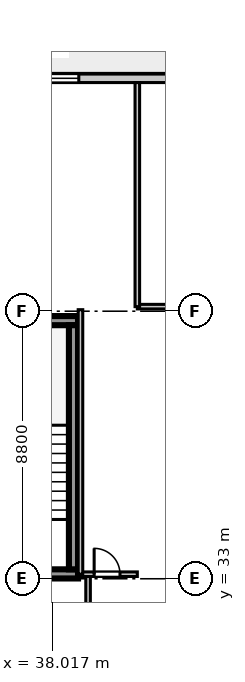
"""IFC4 building model, lengths in metres.
Left out: names, types, materials, properties, quantities, classifications, styles, units other than length and angle.
Written with IfcOpenShell. Run it as: python <this file> out.ifc"""

import sys

from ifc_helpers import new_model, si_unit, direction, frame, frame_2d, origin, place, context, subcontext, project, spatial, rectangle, extrude, element, fill, save


model = new_model("IFC4")
c1 = context("Model", 3, precision=1e-05, world=origin(), true_north=direction((0.0, 1.0)))
c2 = subcontext(c1, "Body", "Model", "MODEL_VIEW")
j1 = project(units=[si_unit("LENGTHUNIT", "METRE"), si_unit("PLANEANGLEUNIT", "RADIAN")], contexts=[c1])
p1 = place(None, origin())
s1 = spatial("IfcSite", under=j1, at=p1, CompositionType="ELEMENT")
p2 = place(p1, origin())
s2 = spatial("IfcBuilding", under=s1, at=p2, CompositionType="ELEMENT")
p3 = place(p2, frame((0.0, 0.0, 196.4)))
s3 = spatial("IfcBuildingStorey", under=s2, at=p3, CompositionType="ELEMENT", Elevation=196.4)
for number, where, z_axis, x_axis in (
    (1, (34.275, 33.16, 0.0), (0.0, 0.0, 1.0), (1.0, 0.0, 0.0)),
    (2, (34.275, 41.49, 0.0), (0.0, 0.0, 1.0), (1.0, 0.0, 0.0)),
):
    element("IfcWall", number, at=place(p3, frame(where, z_axis=z_axis, x_axis=x_axis)), inside=s3, PredefinedType="SHEAR", context=c2, shape_type="SweptSolid", body=[
        extrude(rectangle(XDim=4.595, YDim=0.3, at=frame_2d((2.298, 0.0))), origin(), (0.0, 0.0, 1.0), 3.6),
    ])
p4 = place(p3, frame((38.72, 33.31, 0.0), z_axis=(0.0, 0.0, 1.0), x_axis=(0.0, 1.0, 0.0)))
e3 = element("IfcWall", 3, at=p4, inside=s3, PredefinedType="SHEAR", context=c2, shape_type="SweptSolid", body=[
    extrude(rectangle(XDim=8.03, YDim=0.3, at=frame_2d((4.015, 0.0))), origin(), (0.0, 0.0, 1.0), 3.6),
])
p5 = place(p3, frame((45.55, 49.46, 0.0), z_axis=(0.0, 0.0, 1.0), x_axis=(-1.0, 0.0, 0.0)))
e4 = element("IfcWall", 4, at=p5, inside=s3, PredefinedType="STANDARD", context=c2, shape_type="SweptSolid", body=[
    extrude(rectangle(XDim=32.5, YDim=0.28, at=frame_2d((16.25, 0.0))), origin(), (0.0, 0.0, 1.0), 3.6),
])
p6 = place(p5, frame((30.55, 0.0, 0.0)))
e5 = element("IfcOpeningElement", 5, at=p6, cuts=e4, PredefinedType="OPENING", context=c2, shape_type="SweptSolid", body=[
    extrude(rectangle(XDim=1.0, YDim=2.05, at=frame_2d((0.5, 1.025))), frame((0.0, 0.15, 0.0), z_axis=(0.0, -1.0, 0.0), x_axis=(1.0, 0.0, 0.0)), (0.0, 0.0, 1.0), 0.3),
])
p7 = place(p5, frame((24.27, 0.0, 0.8)))
e6 = element("IfcOpeningElement", 6, at=p7, cuts=e4, PredefinedType="OPENING", context=c2, shape_type="SweptSolid", body=[
    extrude(rectangle(XDim=2.4, YDim=2.05, at=frame_2d((1.2, 1.025))), frame((0.0, 0.15, 0.0), z_axis=(0.0, -1.0, 0.0), x_axis=(1.0, 0.0, 0.0)), (0.0, 0.0, 1.0), 0.3),
])
p8 = place(p5, frame((18.43, 0.0, 0.8)))
e7 = element("IfcOpeningElement", 7, at=p8, cuts=e4, PredefinedType="OPENING", context=c2, shape_type="SweptSolid", body=[
    extrude(rectangle(XDim=1.2, YDim=1.75, at=frame_2d((0.6, 0.875))), frame((0.0, 0.15, 0.0), z_axis=(0.0, -1.0, 0.0), x_axis=(1.0, 0.0, 0.0)), (0.0, 0.0, 1.0), 0.3),
])
p9 = place(p5, frame((16.065, 0.0, 0.8)))
e8 = element("IfcOpeningElement", 8, at=p9, cuts=e4, PredefinedType="OPENING", context=c2, shape_type="SweptSolid", body=[
    extrude(rectangle(XDim=1.2, YDim=1.75, at=frame_2d((0.6, 0.875))), frame((0.0, 0.15, 0.0), z_axis=(0.0, -1.0, 0.0), x_axis=(1.0, 0.0, 0.0)), (0.0, 0.0, 1.0), 0.3),
])
p10 = place(p5, frame((13.455, 0.0, 0.8)))
e9 = element("IfcOpeningElement", 9, at=p10, cuts=e4, PredefinedType="OPENING", context=c2, shape_type="SweptSolid", body=[
    extrude(rectangle(XDim=1.65, YDim=1.95, at=frame_2d((0.825, 0.975))), frame((0.0, 0.15, 0.0), z_axis=(0.0, -1.0, 0.0), x_axis=(1.0, 0.0, 0.0)), (0.0, 0.0, 1.0), 0.3),
])
p11 = place(p5, frame((11.295, 0.0, 0.8)))
e10 = element("IfcOpeningElement", 10, at=p11, cuts=e4, PredefinedType="OPENING", context=c2, shape_type="SweptSolid", body=[
    extrude(rectangle(XDim=1.2, YDim=1.75, at=frame_2d((0.6, 0.875))), frame((0.0, 0.15, 0.0), z_axis=(0.0, -1.0, 0.0), x_axis=(1.0, 0.0, 0.0)), (0.0, 0.0, 1.0), 0.3),
])
p12 = place(p5, frame((6.655, 0.0, 0.8)))
e11 = element("IfcOpeningElement", 11, at=p12, cuts=e4, PredefinedType="OPENING", context=c2, shape_type="SweptSolid", body=[
    extrude(rectangle(XDim=2.25, YDim=2.0, at=frame_2d((1.125, 1.0))), frame((0.0, 0.15, 0.0), z_axis=(0.0, -1.0, 0.0), x_axis=(1.0, 0.0, 0.0)), (0.0, 0.0, 1.0), 0.3),
])
p13 = place(p5, frame((1.52, 0.0, 0.8)))
e12 = element("IfcOpeningElement", 12, at=p13, cuts=e4, PredefinedType="OPENING", context=c2, shape_type="SweptSolid", body=[
    extrude(rectangle(XDim=1.8, YDim=2.0, at=frame_2d((0.9, 1.0))), frame((0.0, 0.15, 0.0), z_axis=(0.0, -1.0, 0.0), x_axis=(1.0, 0.0, 0.0)), (0.0, 0.0, 1.0), 0.3),
])
p14 = place(p3, frame((39.2, 28.86, 0.0), z_axis=(0.0, 0.0, 1.0), x_axis=(0.0, 1.0, 0.0)))
e13 = element("IfcWall", 13, at=p14, inside=s3, PredefinedType="PARTITIONING", context=c2, shape_type="SweptSolid", body=[
    extrude(rectangle(XDim=4.22, YDim=0.15, at=frame_2d((2.11, 0.0))), origin(), (0.0, 0.0, 1.0), 3.6),
])
p15 = place(p3, frame((40.82, 41.95, 0.0), z_axis=(0.0, 0.0, 1.0), x_axis=(1.0, 0.0, 0.0)))
e14 = element("IfcWall", 14, at=p15, inside=s3, PredefinedType="PARTITIONING", context=c2, shape_type="SweptSolid", body=[
    extrude(rectangle(XDim=9.7, YDim=0.15, at=frame_2d((4.85, 0.0))), origin(), (0.0, 0.0, 1.0), 2.95),
])
p16 = place(p3, frame((38.95, 33.15, 0.0), z_axis=(0.0, 0.0, 1.0), x_axis=(1.0, 0.0, 0.0)))
e15 = element("IfcWall", 15, at=p16, inside=s3, PredefinedType="PARTITIONING", context=c2, shape_type="SweptSolid", body=[
    extrude(rectangle(XDim=1.87, YDim=0.15, at=frame_2d((0.935, 0.0))), origin(), (0.0, 0.0, 1.0), 3.6),
])
p17 = place(p16, frame((0.45, 0.0, 0.0)))
e16 = element("IfcOpeningElement", 16, at=p17, cuts=e15, PredefinedType="OPENING", context=c2, shape_type="SweptSolid", body=[
    extrude(rectangle(XDim=0.85, YDim=2.05, at=frame_2d((0.425, 1.025))), frame((0.0, 0.085, 0.0), z_axis=(0.0, -1.0, 0.0), x_axis=(1.0, 0.0, 0.0)), (0.0, 0.0, 1.0), 0.17),
])
p18 = place(p3, frame((38.95, 33.15, 0.0), z_axis=(0.0, 0.0, 1.0), x_axis=(0.0, 1.0, 0.0)))
e17 = element("IfcWall", 17, at=p18, inside=s3, PredefinedType="PARTITIONING", context=c2, shape_type="SweptSolid", body=[
    extrude(rectangle(XDim=8.7, YDim=0.15, at=frame_2d((4.35, 0.0))), origin(), (0.0, 0.0, 1.0), 3.6),
])
p19 = place(p3, frame((40.82, 41.95, 0.0), z_axis=(0.0, 0.0, 1.0), x_axis=(0.0, 1.0, 0.0)))
e18 = element("IfcWall", 18, at=p19, inside=s3, PredefinedType="PARTITIONING", context=c2, shape_type="SweptSolid", body=[
    extrude(rectangle(XDim=7.37, YDim=0.15, at=frame_2d((3.685, 0.0))), origin(), (0.0, 0.0, 1.0), 3.6),
])
p20 = place(p12, origin())
e19 = element("IfcWindow", 19, at=p20, inside=s3, PartitioningType="SINGLE_PANEL", PredefinedType="WINDOW", context=c2, shape_type="SweptSolid", body=[
    extrude(rectangle(XDim=2.25, YDim=2.0, at=frame_2d((1.125, 1.0))), frame((0.0, 0.03, 0.0), z_axis=(0.0, -1.0, 0.0), x_axis=(1.0, 0.0, 0.0)), (0.0, 0.0, 1.0), 0.06),
])
fill(e11, e19)
p21 = place(p17, origin())
e20 = element("IfcDoor", 20, at=p21, inside=s3, OperationType="SINGLE_SWING_LEFT", PredefinedType="DOOR", context=c2, shape_type="SweptSolid", body=[
    extrude(rectangle(XDim=0.85, YDim=2.05, at=frame_2d((0.425, 1.025))), frame((0.0, 0.025, 0.0), z_axis=(0.0, -1.0, 0.0), x_axis=(1.0, 0.0, 0.0)), (0.0, 0.0, 1.0), 0.05),
])
fill(e16, e20)
save(model, sys.argv[1])
